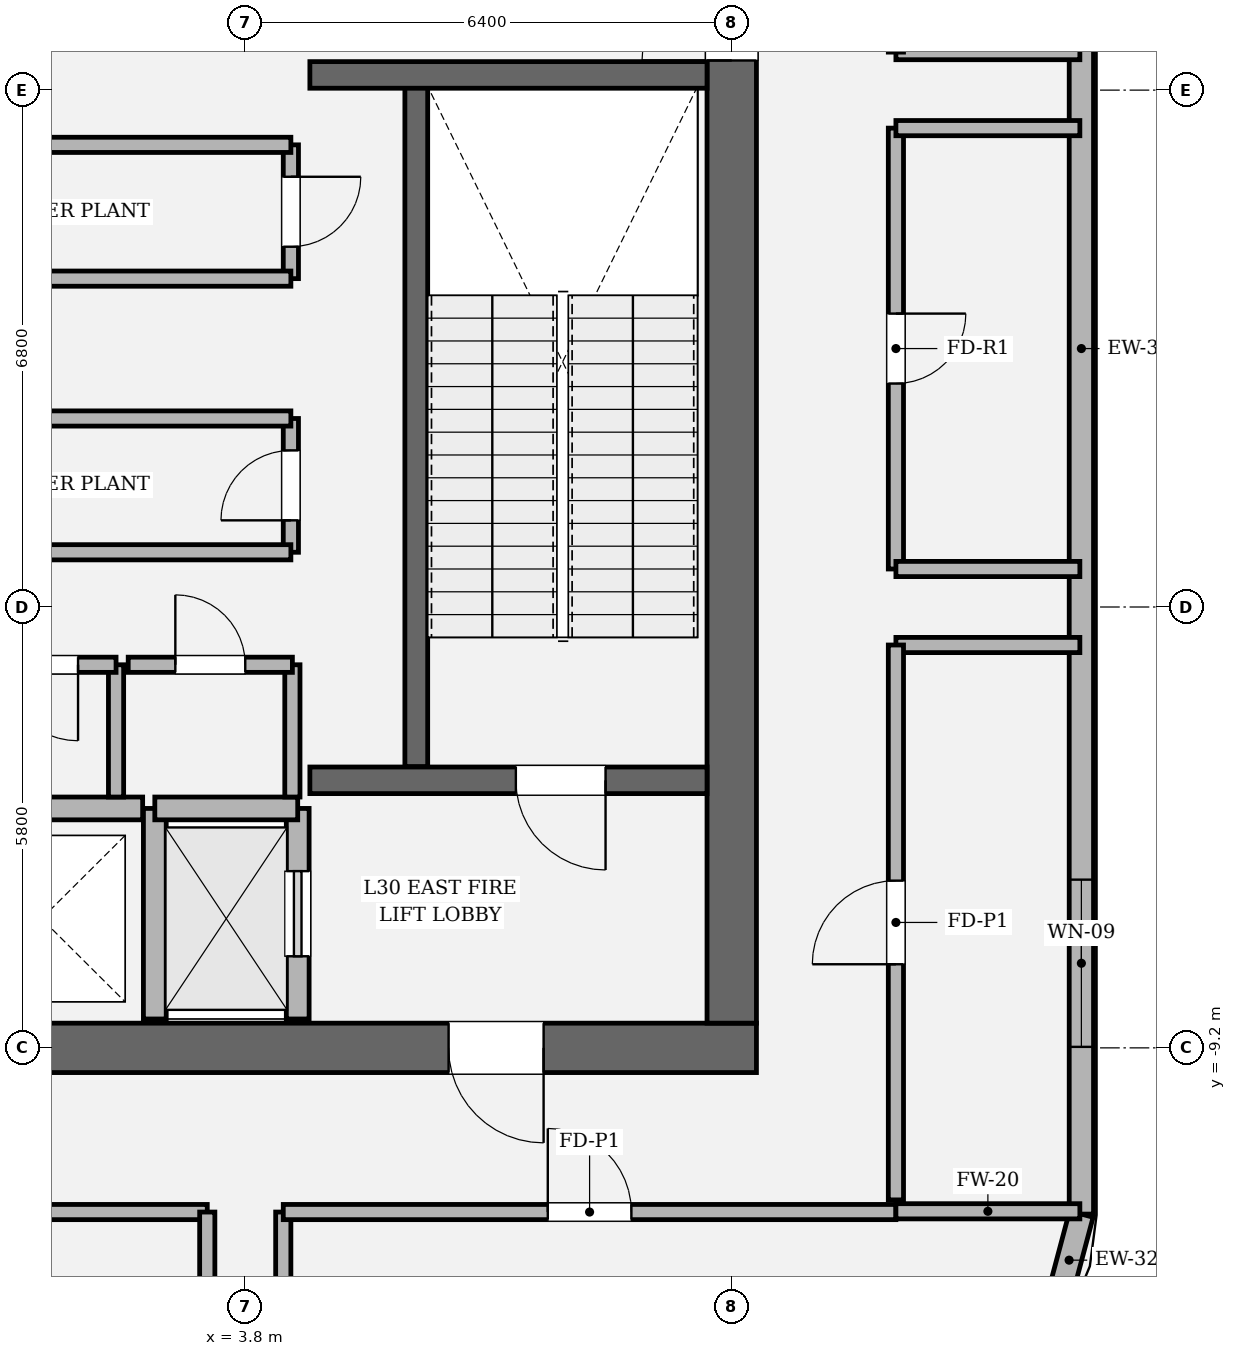
"""IFC4 building model, lengths in metres.
Left out: names, types, materials, properties, quantities, classifications, styles, units other than length and angle.
Written with IfcOpenShell. Run it as: python <this file> out.ifc"""

import sys

from ifc_helpers import new_model, si_unit, direction, frame, frame_2d, origin, place, context, subcontext, project, spatial, rectangle, extrude, element, fill, save


model = new_model("IFC4")
c1 = context("Model", 3, precision=1e-05, world=origin(), true_north=direction((0.0, 1.0)))
c2 = subcontext(c1, "Body", "Model", "MODEL_VIEW")
j1 = project(units=[si_unit("LENGTHUNIT", "METRE"), si_unit("PLANEANGLEUNIT", "RADIAN")], contexts=[c1])
p1 = place(None, origin())
s1 = spatial("IfcSite", under=j1, at=p1, CompositionType="ELEMENT")
p2 = place(p1, origin())
s2 = spatial("IfcBuilding", under=s1, at=p2, CompositionType="ELEMENT")
p3 = place(p2, frame((0.0, 0.0, 130.2)))
s3 = spatial("IfcBuildingStorey", under=s2, at=p3, CompositionType="ELEMENT", Elevation=130.2)
p4 = place(p3, frame((10.525, -9.2, 0.0), z_axis=(0.0, 0.0, 1.0), x_axis=(-1.0, 0.0, 0.0)))
e1 = element("IfcWall", 1, at=p4, inside=s3, PredefinedType="SHEAR", context=c2, shape_type="SweptSolid", body=[
    extrude(rectangle(XDim=21.05, YDim=0.65, at=frame_2d((10.525, 0.0))), origin(), (0.0, 0.0, 1.0), 4.8),
])
p5 = place(p4, frame((2.8, 0.0, 0.0)))
e2 = element("IfcOpeningElement", 2, at=p5, cuts=e1, PredefinedType="OPENING", context=c2, shape_type="SweptSolid", body=[
    extrude(rectangle(XDim=1.25, YDim=2.25, at=frame_2d((0.625, 1.125))), frame((0.0, 0.335, 0.0), z_axis=(0.0, -1.0, 0.0), x_axis=(1.0, 0.0, 0.0)), (0.0, 0.0, 1.0), 0.67),
])
p6 = place(p4, frame((17.0, 0.0, 0.0)))
e3 = element("IfcOpeningElement", 3, at=p6, cuts=e1, PredefinedType="OPENING", context=c2, shape_type="SweptSolid", body=[
    extrude(rectangle(XDim=1.25, YDim=2.25, at=frame_2d((0.625, 1.125))), frame((0.0, 0.335, 0.0), z_axis=(0.0, -1.0, 0.0), x_axis=(1.0, 0.0, 0.0)), (0.0, 0.0, 1.0), 0.67),
])
p7 = place(p3, frame((10.2, 8.875, 0.0), z_axis=(0.0, 0.0, 1.0), x_axis=(0.0, -1.0, 0.0)))
e4 = element("IfcWall", 4, at=p7, inside=s3, PredefinedType="SHEAR", context=c2, shape_type="SweptSolid", body=[
    extrude(rectangle(XDim=17.75, YDim=0.65, at=frame_2d((8.875, 0.0))), origin(), (0.0, 0.0, 1.0), 4.8),
])
p8 = place(p7, frame((3.905, 0.0, 0.0)))
e5 = element("IfcOpeningElement", 5, at=p8, cuts=e4, PredefinedType="OPENING", context=c2, shape_type="SweptSolid", body=[
    extrude(rectangle(XDim=1.18, YDim=2.2, at=frame_2d((0.59, 1.1))), frame((0.0, 0.335, 0.0), z_axis=(0.0, -1.0, 0.0), x_axis=(1.0, 0.0, 0.0)), (0.0, 0.0, 1.0), 0.67),
])
p9 = place(p3, frame((6.05, 3.45, 0.0), z_axis=(0.0, 0.0, 1.0), x_axis=(0.0, -1.0, 0.0)))
e6 = element("IfcWall", 6, at=p9, inside=s3, PredefinedType="SOLIDWALL", context=c2, shape_type="SweptSolid", body=[
    extrude(rectangle(XDim=8.95, YDim=0.3, at=frame_2d((4.475, 0.0))), origin(), (0.0, 0.0, 1.0), 4.8),
])
p10 = place(p3, frame((4.65, -5.68, 0.0), z_axis=(0.0, 0.0, 1.0), x_axis=(1.0, 0.0, 0.0)))
e7 = element("IfcWall", 7, at=p10, inside=s3, PredefinedType="SOLIDWALL", context=c2, shape_type="SweptSolid", body=[
    extrude(rectangle(XDim=5.225, YDim=0.35, at=frame_2d((2.613, 0.0))), origin(), (0.0, 0.0, 1.0), 4.8),
])
p11 = place(p10, frame((2.71, 0.0, 0.0)))
e8 = element("IfcOpeningElement", 8, at=p11, cuts=e7, PredefinedType="OPENING", context=c2, shape_type="SweptSolid", body=[
    extrude(rectangle(XDim=1.18, YDim=2.2, at=frame_2d((0.59, 1.1))), frame((0.0, 0.185, 0.0), z_axis=(0.0, -1.0, 0.0), x_axis=(1.0, 0.0, 0.0)), (0.0, 0.0, 1.0), 0.37),
])
p12 = place(p3, frame((4.65, 3.6, 0.0), z_axis=(0.0, 0.0, 1.0), x_axis=(1.0, 0.0, 0.0)))
e9 = element("IfcWall", 9, at=p12, inside=s3, PredefinedType="SOLIDWALL", context=c2, shape_type="SweptSolid", body=[
    extrude(rectangle(XDim=5.225, YDim=0.35, at=frame_2d((2.613, 0.0))), origin(), (0.0, 0.0, 1.0), 4.8),
])
p13 = place(p3, frame((14.477, -12.599, 0.0), z_axis=(0.0, 0.0, 1.0), x_axis=(0.25748094776, 0.966283375382, 0.0)))
e10 = element("IfcWall", 10, at=p13, inside=s3, PredefinedType="SOLIDWALL", context=c2, shape_type="SweptSolid", body=[
    extrude(rectangle(XDim=1.254, YDim=0.32, at=frame_2d((0.627, 0.0))), origin(), (0.0, 0.0, 1.0), 3.984),
])
p14 = place(p3, frame((14.8, -11.387, 0.0), z_axis=(0.0, 0.0, 1.0), x_axis=(0.0, 1.0, 0.0)))
e11 = element("IfcWall", 11, at=p14, inside=s3, PredefinedType="SOLIDWALL", context=c2, shape_type="SweptSolid", body=[
    extrude(rectangle(XDim=22.774, YDim=0.32, at=frame_2d((11.387, 0.0))), origin(), (0.0, 0.0, 1.0), 3.834),
])
p15 = place(p14, frame((2.2, 0.0, 0.9)))
e12 = element("IfcOpeningElement", 12, at=p15, cuts=e11, PredefinedType="OPENING", context=c2, shape_type="SweptSolid", body=[
    extrude(rectangle(XDim=2.2, YDim=1.2, at=frame_2d((1.1, 0.6))), frame((0.0, 0.17, 0.0), z_axis=(0.0, -1.0, 0.0), x_axis=(1.0, 0.0, 0.0)), (0.0, 0.0, 1.0), 0.34),
])
p16 = place(p14, frame((18.374, 0.0, 0.9)))
e13 = element("IfcOpeningElement", 13, at=p16, cuts=e11, PredefinedType="OPENING", context=c2, shape_type="SweptSolid", body=[
    extrude(rectangle(XDim=2.2, YDim=1.2, at=frame_2d((1.1, 0.6))), frame((0.0, 0.17, 0.0), z_axis=(0.0, -1.0, 0.0), x_axis=(1.0, 0.0, 0.0)), (0.0, 0.0, 1.0), 0.34),
])
p17 = place(p3, frame((4.49, -8.82, 0.0), z_axis=(0.0, 0.0, 1.0), x_axis=(0.0, 1.0, 0.0)))
e14 = element("IfcWall", 14, at=p17, inside=s3, PredefinedType="SOLIDWALL", context=c2, shape_type="SweptSolid", body=[
    extrude(rectangle(XDim=2.77, YDim=0.3, at=frame_2d((1.385, 0.0))), origin(), (0.0, 0.0, 1.0), 4.54),
])
p18 = place(p17, frame((0.825, 0.0, 0.0)))
e15 = element("IfcOpeningElement", 15, at=p18, cuts=e14, PredefinedType="OPENING", context=c2, shape_type="SweptSolid", body=[
    extrude(rectangle(XDim=1.12, YDim=2.25, at=frame_2d((0.56, 1.125))), frame((0.0, 0.16, 0.0), z_axis=(0.0, -1.0, 0.0), x_axis=(1.0, 0.0, 0.0)), (0.0, 0.0, 1.0), 0.32),
])
p19 = place(p3, frame((2.61, -8.82, 0.0), z_axis=(0.0, 0.0, 1.0), x_axis=(0.0, 1.0, 0.0)))
e16 = element("IfcWall", 16, at=p19, inside=s3, PredefinedType="SOLIDWALL", context=c2, shape_type="SweptSolid", body=[
    extrude(rectangle(XDim=2.77, YDim=0.3, at=frame_2d((1.385, 0.0))), origin(), (0.0, 0.0, 1.0), 4.54),
])
p20 = place(p3, frame((2.61, -6.05, 0.0), z_axis=(0.0, 0.0, 1.0), x_axis=(1.0, 0.0, 0.0)))
e17 = element("IfcWall", 17, at=p20, inside=s3, PredefinedType="SOLIDWALL", context=c2, shape_type="SweptSolid", body=[
    extrude(rectangle(XDim=1.88, YDim=0.3, at=frame_2d((0.94, 0.0))), origin(), (0.0, 0.0, 1.0), 4.54),
])
p21 = place(p3, frame((-2.45, -6.05, 0.0), z_axis=(0.0, 0.0, 1.0), x_axis=(1.0, 0.0, 0.0)))
e18 = element("IfcWall", 18, at=p21, inside=s3, PredefinedType="SOLIDWALL", context=c2, shape_type="SweptSolid", body=[
    extrude(rectangle(XDim=4.9, YDim=0.3, at=frame_2d((2.45, 0.0))), origin(), (0.0, 0.0, 1.0), 4.54),
])
p22 = place(p3, frame((2.1, -5.9, 0.0), z_axis=(0.0, 0.0, 1.0), x_axis=(0.0, 1.0, 0.0)))
e19 = element("IfcWall", 19, at=p22, inside=s3, PredefinedType="SOLIDWALL", context=c2, shape_type="SweptSolid", body=[
    extrude(rectangle(XDim=1.74, YDim=0.2, at=frame_2d((0.87, 0.0))), origin(), (0.0, 0.0, 1.0), 4.54),
])
p23 = place(p3, frame((2.1, -4.16, 0.0), z_axis=(0.0, 0.0, 1.0), x_axis=(-1.0, 0.0, 0.0)))
e20 = element("IfcWall", 20, at=p23, inside=s3, PredefinedType="SOLIDWALL", context=c2, shape_type="SweptSolid", body=[
    extrude(rectangle(XDim=2.0, YDim=0.2, at=frame_2d((1.0, 0.0))), origin(), (0.0, 0.0, 1.0), 4.54),
])
p24 = place(p23, frame((0.5, 0.0, 0.0)))
e21 = element("IfcOpeningElement", 21, at=p24, cuts=e20, PredefinedType="OPENING", context=c2, shape_type="SweptSolid", body=[
    extrude(rectangle(XDim=1.0, YDim=2.15, at=frame_2d((0.5, 1.075))), frame((0.0, 0.11, 0.0), z_axis=(0.0, -1.0, 0.0), x_axis=(1.0, 0.0, 0.0)), (0.0, 0.0, 1.0), 0.22),
])
p25 = place(p3, frame((4.42, -5.9, 0.0), z_axis=(0.0, 0.0, 1.0), x_axis=(0.0, 1.0, 0.0)))
e22 = element("IfcWall", 22, at=p25, inside=s3, PredefinedType="SOLIDWALL", context=c2, shape_type="SweptSolid", body=[
    extrude(rectangle(XDim=1.74, YDim=0.2, at=frame_2d((0.87, 0.0))), origin(), (0.0, 0.0, 1.0), 4.54),
])
p26 = place(p3, frame((4.42, -4.16, 0.0), z_axis=(0.0, 0.0, 1.0), x_axis=(-1.0, 0.0, 0.0)))
e23 = element("IfcWall", 23, at=p26, inside=s3, PredefinedType="SOLIDWALL", context=c2, shape_type="SweptSolid", body=[
    extrude(rectangle(XDim=2.16, YDim=0.2, at=frame_2d((1.08, 0.0))), origin(), (0.0, 0.0, 1.0), 4.54),
])
p27 = place(p26, frame((0.62, 0.0, 0.0)))
e24 = element("IfcOpeningElement", 24, at=p27, cuts=e23, PredefinedType="OPENING", context=c2, shape_type="SweptSolid", body=[
    extrude(rectangle(XDim=0.92, YDim=2.1, at=frame_2d((0.46, 1.05))), frame((0.0, 0.11, 0.0), z_axis=(0.0, -1.0, 0.0), x_axis=(1.0, 0.0, 0.0)), (0.0, 0.0, 1.0), 0.22),
])
p28 = place(p3, frame((4.4, -2.68, 0.0), z_axis=(0.0, 0.0, 1.0), x_axis=(0.0, 1.0, 0.0)))
e25 = element("IfcWall", 25, at=p28, inside=s3, PredefinedType="SOLIDWALL", context=c2, shape_type="SweptSolid", body=[
    extrude(rectangle(XDim=1.76, YDim=0.2, at=frame_2d((0.88, 0.0))), origin(), (0.0, 0.0, 1.0), 4.54),
])
p29 = place(p28, frame((0.42, 0.0, 0.0)))
e26 = element("IfcOpeningElement", 26, at=p29, cuts=e25, PredefinedType="OPENING", context=c2, shape_type="SweptSolid", body=[
    extrude(rectangle(XDim=0.92, YDim=2.1, at=frame_2d((0.46, 1.05))), frame((0.0, 0.11, 0.0), z_axis=(0.0, -1.0, 0.0), x_axis=(1.0, 0.0, 0.0)), (0.0, 0.0, 1.0), 0.22),
])
for number, where, z_axis, x_axis in (
    (27, (4.4, -0.92, 0.0), (0.0, 0.0, 1.0), (-1.0, 0.0, 0.0)),
    (28, (-4.4, -2.68, 0.0), (0.0, 0.0, 1.0), (1.0, 0.0, 0.0)),
):
    element("IfcWall", number, at=place(p3, frame(where, z_axis=z_axis, x_axis=x_axis)), inside=s3, PredefinedType="SOLIDWALL", context=c2, shape_type="SweptSolid", body=[
        extrude(rectangle(XDim=8.8, YDim=0.2, at=frame_2d((4.4, 0.0))), origin(), (0.0, 0.0, 1.0), 4.54),
    ])
p30 = place(p3, frame((4.4, 0.92, 0.0), z_axis=(0.0, 0.0, 1.0), x_axis=(0.0, 1.0, 0.0)))
e29 = element("IfcWall", 29, at=p30, inside=s3, PredefinedType="SOLIDWALL", context=c2, shape_type="SweptSolid", body=[
    extrude(rectangle(XDim=1.76, YDim=0.2, at=frame_2d((0.88, 0.0))), origin(), (0.0, 0.0, 1.0), 4.54),
])
p31 = place(p30, frame((0.42, 0.0, 0.0)))
e30 = element("IfcOpeningElement", 30, at=p31, cuts=e29, PredefinedType="OPENING", context=c2, shape_type="SweptSolid", body=[
    extrude(rectangle(XDim=0.92, YDim=2.1, at=frame_2d((0.46, 1.05))), frame((0.0, 0.11, 0.0), z_axis=(0.0, -1.0, 0.0), x_axis=(1.0, 0.0, 0.0)), (0.0, 0.0, 1.0), 0.22),
])
for number, where, z_axis, x_axis in (
    (31, (4.4, 2.68, 0.0), (0.0, 0.0, 1.0), (-1.0, 0.0, 0.0)),
    (32, (-4.4, 0.92, 0.0), (0.0, 0.0, 1.0), (1.0, 0.0, 0.0)),
):
    element("IfcWall", number, at=place(p3, frame(where, z_axis=z_axis, x_axis=x_axis)), inside=s3, PredefinedType="SOLIDWALL", context=c2, shape_type="SweptSolid", body=[
        extrude(rectangle(XDim=8.8, YDim=0.2, at=frame_2d((4.4, 0.0))), origin(), (0.0, 0.0, 1.0), 4.54),
    ])
p32 = place(p3, frame((-3.3, -11.36, 0.0), z_axis=(0.0, 0.0, 1.0), x_axis=(1.0, 0.0, 0.0)))
e33 = element("IfcWall", 33, at=p32, inside=s3, PredefinedType="SOLIDWALL", context=c2, shape_type="SweptSolid", body=[
    extrude(rectangle(XDim=6.6, YDim=0.2, at=frame_2d((3.3, 0.0))), origin(), (0.0, 0.0, 1.0), 4.54),
])
p33 = place(p32, frame((2.84, 0.0, 0.0)))
e34 = element("IfcOpeningElement", 34, at=p33, cuts=e33, PredefinedType="OPENING", context=c2, shape_type="SweptSolid", body=[
    extrude(rectangle(XDim=0.92, YDim=2.1, at=frame_2d((0.46, 1.05))), frame((0.0, 0.11, 0.0), z_axis=(0.0, -1.0, 0.0), x_axis=(1.0, 0.0, 0.0)), (0.0, 0.0, 1.0), 0.22),
])
for number, where, z_axis, x_axis in (
    (35, (3.3, -11.36, 0.0), (0.0, 0.0, 1.0), (0.0, -1.0, 0.0)),
    (36, (4.3, -13.78, 0.0), (0.0, 0.0, 1.0), (0.0, 1.0, 0.0)),
):
    element("IfcWall", number, at=place(p3, frame(where, z_axis=z_axis, x_axis=x_axis)), inside=s3, PredefinedType="SOLIDWALL", context=c2, shape_type="SweptSolid", body=[
        extrude(rectangle(XDim=2.42, YDim=0.2, at=frame_2d((1.21, 0.0))), origin(), (0.0, 0.0, 1.0), 3.984),
    ])
p34 = place(p3, frame((4.3, -11.36, 0.0), z_axis=(0.0, 0.0, 1.0), x_axis=(1.0, 0.0, 0.0)))
e37 = element("IfcWall", 37, at=p34, inside=s3, PredefinedType="SOLIDWALL", context=c2, shape_type="SweptSolid", body=[
    extrude(rectangle(XDim=8.06, YDim=0.2, at=frame_2d((4.03, 0.0))), origin(), (0.0, 0.0, 1.0), 4.54),
])
p35 = place(p34, frame((3.48, 0.0, 0.0)))
e38 = element("IfcOpeningElement", 38, at=p35, cuts=e37, PredefinedType="OPENING", context=c2, shape_type="SweptSolid", body=[
    extrude(rectangle(XDim=1.1, YDim=2.2, at=frame_2d((0.55, 1.1))), frame((0.0, 0.11, 0.0), z_axis=(0.0, -1.0, 0.0), x_axis=(1.0, 0.0, 0.0)), (0.0, 0.0, 1.0), 0.22),
])
for number, where, z_axis, x_axis in (
    (39, (12.36, -11.35, 0.0), (0.0, 0.0, 1.0), (1.0, 0.0, 0.0)),
    (40, (12.36, -3.9, 0.0), (0.0, 0.0, 1.0), (1.0, 0.0, 0.0)),
):
    element("IfcWall", number, at=place(p3, frame(where, z_axis=z_axis, x_axis=x_axis)), inside=s3, PredefinedType="SOLIDWALL", context=c2, shape_type="SweptSolid", body=[
        extrude(rectangle(XDim=2.42, YDim=0.2, at=frame_2d((1.21, 0.0))), origin(), (0.0, 0.0, 1.0), 3.984),
    ])
p36 = place(p3, frame((12.36, -11.2, 0.0), z_axis=(0.0, 0.0, 1.0), x_axis=(0.0, 1.0, 0.0)))
e41 = element("IfcWall", 41, at=p36, inside=s3, PredefinedType="SOLIDWALL", context=c2, shape_type="SweptSolid", body=[
    extrude(rectangle(XDim=7.3, YDim=0.2, at=frame_2d((3.65, 0.0))), origin(), (0.0, 0.0, 1.0), 4.54),
])
p37 = place(p36, frame((3.1, 0.0, 0.0)))
e42 = element("IfcOpeningElement", 42, at=p37, cuts=e41, PredefinedType="OPENING", context=c2, shape_type="SweptSolid", body=[
    extrude(rectangle(XDim=1.1, YDim=2.2, at=frame_2d((0.55, 1.1))), frame((0.0, 0.11, 0.0), z_axis=(0.0, -1.0, 0.0), x_axis=(1.0, 0.0, 0.0)), (0.0, 0.0, 1.0), 0.22),
])
p38 = place(p3, frame((12.36, -2.9, 0.0), z_axis=(0.0, 0.0, 1.0), x_axis=(0.0, 1.0, 0.0)))
e43 = element("IfcWall", 43, at=p38, inside=s3, PredefinedType="SOLIDWALL", context=c2, shape_type="SweptSolid", body=[
    extrude(rectangle(XDim=5.8, YDim=0.2, at=frame_2d((2.9, 0.0))), origin(), (0.0, 0.0, 1.0), 4.54),
])
p39 = place(p38, frame((2.44, 0.0, 0.0)))
e44 = element("IfcOpeningElement", 44, at=p39, cuts=e43, PredefinedType="OPENING", context=c2, shape_type="SweptSolid", body=[
    extrude(rectangle(XDim=0.92, YDim=2.1, at=frame_2d((0.46, 1.05))), frame((0.0, 0.11, 0.0), z_axis=(0.0, -1.0, 0.0), x_axis=(1.0, 0.0, 0.0)), (0.0, 0.0, 1.0), 0.22),
])
for number, where, z_axis, x_axis in (
    (45, (12.36, 2.9, 0.0), (0.0, 0.0, 1.0), (1.0, 0.0, 0.0)),
    (46, (14.78, -2.9, 0.0), (0.0, 0.0, 1.0), (-1.0, 0.0, 0.0)),
    (47, (14.78, 3.9, 0.0), (0.0, 0.0, 1.0), (-1.0, 0.0, 0.0)),
):
    element("IfcWall", number, at=place(p3, frame(where, z_axis=z_axis, x_axis=x_axis)), inside=s3, PredefinedType="SOLIDWALL", context=c2, shape_type="SweptSolid", body=[
        extrude(rectangle(XDim=2.42, YDim=0.2, at=frame_2d((1.21, 0.0))), origin(), (0.0, 0.0, 1.0), 3.984),
    ])
p40 = place(p3, frame((12.36, 3.9, 0.0), z_axis=(0.0, 0.0, 1.0), x_axis=(0.0, 1.0, 0.0)))
e48 = element("IfcWall", 48, at=p40, inside=s3, PredefinedType="SOLIDWALL", context=c2, shape_type="SweptSolid", body=[
    extrude(rectangle(XDim=7.3, YDim=0.2, at=frame_2d((3.65, 0.0))), origin(), (0.0, 0.0, 1.0), 4.54),
])
p41 = place(p40, frame((3.1, 0.0, 0.0)))
e49 = element("IfcOpeningElement", 49, at=p41, cuts=e48, PredefinedType="OPENING", context=c2, shape_type="SweptSolid", body=[
    extrude(rectangle(XDim=1.1, YDim=2.2, at=frame_2d((0.55, 1.1))), frame((0.0, 0.11, 0.0), z_axis=(0.0, -1.0, 0.0), x_axis=(1.0, 0.0, 0.0)), (0.0, 0.0, 1.0), 0.22),
])
p42 = place(p15, origin())
e50 = element("IfcWindow", 50, at=p42, inside=s3, PartitioningType="SINGLE_PANEL", PredefinedType="WINDOW", context=c2, shape_type="SweptSolid", body=[
    extrude(rectangle(XDim=2.2, YDim=1.2, at=frame_2d((1.1, 0.6))), frame((0.0, 0.03, 0.0), z_axis=(0.0, -1.0, 0.0), x_axis=(1.0, 0.0, 0.0)), (0.0, 0.0, 1.0), 0.06),
])
fill(e12, e50)
p43 = place(p11, origin())
e51 = element("IfcDoor", 51, at=p43, inside=s3, OperationType="SINGLE_SWING_RIGHT", PredefinedType="DOOR", context=c2, shape_type="SweptSolid", body=[
    extrude(rectangle(XDim=1.18, YDim=2.2, at=frame_2d((0.59, 1.1))), frame((0.0, 0.025, 0.0), z_axis=(0.0, -1.0, 0.0), x_axis=(1.0, 0.0, 0.0)), (0.0, 0.0, 1.0), 0.05),
])
fill(e8, e51)
p44 = place(p5, origin())
e52 = element("IfcDoor", 52, at=p44, inside=s3, OperationType="SINGLE_SWING_LEFT", PredefinedType="DOOR", context=c2, shape_type="SweptSolid", body=[
    extrude(rectangle(XDim=1.25, YDim=2.25, at=frame_2d((0.625, 1.125))), frame((0.0, 0.025, 0.0), z_axis=(0.0, -1.0, 0.0), x_axis=(1.0, 0.0, 0.0)), (0.0, 0.0, 1.0), 0.05),
])
fill(e2, e52)
p45 = place(p8, origin())
e53 = element("IfcDoor", 53, at=p45, inside=s3, OperationType="SINGLE_SWING_RIGHT", PredefinedType="DOOR", context=c2, shape_type="SweptSolid", body=[
    extrude(rectangle(XDim=1.18, YDim=2.2, at=frame_2d((0.59, 1.1))), frame((0.0, 0.025, 0.0), z_axis=(0.0, -1.0, 0.0), x_axis=(1.0, 0.0, 0.0)), (0.0, 0.0, 1.0), 0.05),
])
fill(e5, e53)
p46 = place(p18, origin())
e54 = element("IfcDoor", 54, at=p46, inside=s3, OperationType="SLIDING_TO_RIGHT", PredefinedType="DOOR", context=c2, shape_type="SweptSolid", body=[
    extrude(rectangle(XDim=1.12, YDim=2.25, at=frame_2d((0.56, 1.125))), frame((0.0, 0.025, 0.0), z_axis=(0.0, -1.0, 0.0), x_axis=(1.0, 0.0, 0.0)), (0.0, 0.0, 1.0), 0.05),
])
fill(e15, e54)
p47 = place(p24, origin())
e55 = element("IfcDoor", 55, at=p47, inside=s3, OperationType="SINGLE_SWING_LEFT", PredefinedType="DOOR", context=c2, shape_type="SweptSolid", body=[
    extrude(rectangle(XDim=1.0, YDim=2.15, at=frame_2d((0.5, 1.075))), frame((0.0, 0.025, 0.0), z_axis=(0.0, -1.0, 0.0), x_axis=(1.0, 0.0, 0.0)), (0.0, 0.0, 1.0), 0.05),
])
fill(e21, e55)
p48 = place(p27, origin())
e56 = element("IfcDoor", 56, at=p48, inside=s3, OperationType="SINGLE_SWING_RIGHT", PredefinedType="DOOR", context=c2, shape_type="SweptSolid", body=[
    extrude(rectangle(XDim=0.92, YDim=2.1, at=frame_2d((0.46, 1.05))), frame((0.0, 0.025, 0.0), z_axis=(0.0, -1.0, 0.0), x_axis=(1.0, 0.0, 0.0)), (0.0, 0.0, 1.0), 0.05),
])
fill(e24, e56)
p49 = place(p29, origin())
e57 = element("IfcDoor", 57, at=p49, inside=s3, OperationType="SINGLE_SWING_LEFT", PredefinedType="DOOR", context=c2, shape_type="SweptSolid", body=[
    extrude(rectangle(XDim=0.92, YDim=2.1, at=frame_2d((0.46, 1.05))), frame((0.0, 0.025, 0.0), z_axis=(0.0, -1.0, 0.0), x_axis=(1.0, 0.0, 0.0)), (0.0, 0.0, 1.0), 0.05),
])
fill(e26, e57)
p50 = place(p31, origin())
e58 = element("IfcDoor", 58, at=p50, inside=s3, OperationType="SINGLE_SWING_RIGHT", PredefinedType="DOOR", context=c2, shape_type="SweptSolid", body=[
    extrude(rectangle(XDim=0.92, YDim=2.1, at=frame_2d((0.46, 1.05))), frame((0.0, 0.025, 0.0), z_axis=(0.0, -1.0, 0.0), x_axis=(1.0, 0.0, 0.0)), (0.0, 0.0, 1.0), 0.05),
])
fill(e30, e58)
p51 = place(p35, origin())
e59 = element("IfcDoor", 59, at=p51, inside=s3, OperationType="SINGLE_SWING_LEFT", PredefinedType="DOOR", context=c2, shape_type="SweptSolid", body=[
    extrude(rectangle(XDim=1.1, YDim=2.2, at=frame_2d((0.55, 1.1))), frame((0.0, 0.025, 0.0), z_axis=(0.0, -1.0, 0.0), x_axis=(1.0, 0.0, 0.0)), (0.0, 0.0, 1.0), 0.05),
])
fill(e38, e59)
p52 = place(p37, origin())
e60 = element("IfcDoor", 60, at=p52, inside=s3, OperationType="SINGLE_SWING_LEFT", PredefinedType="DOOR", context=c2, shape_type="SweptSolid", body=[
    extrude(rectangle(XDim=1.1, YDim=2.2, at=frame_2d((0.55, 1.1))), frame((0.0, 0.025, 0.0), z_axis=(0.0, -1.0, 0.0), x_axis=(1.0, 0.0, 0.0)), (0.0, 0.0, 1.0), 0.05),
])
fill(e42, e60)
p53 = place(p39, origin())
e61 = element("IfcDoor", 61, at=p53, inside=s3, OperationType="SINGLE_SWING_RIGHT", PredefinedType="DOOR", context=c2, shape_type="SweptSolid", body=[
    extrude(rectangle(XDim=0.92, YDim=2.1, at=frame_2d((0.46, 1.05))), frame((0.0, 0.025, 0.0), z_axis=(0.0, -1.0, 0.0), x_axis=(1.0, 0.0, 0.0)), (0.0, 0.0, 1.0), 0.05),
])
fill(e44, e61)
save(model, sys.argv[1])
